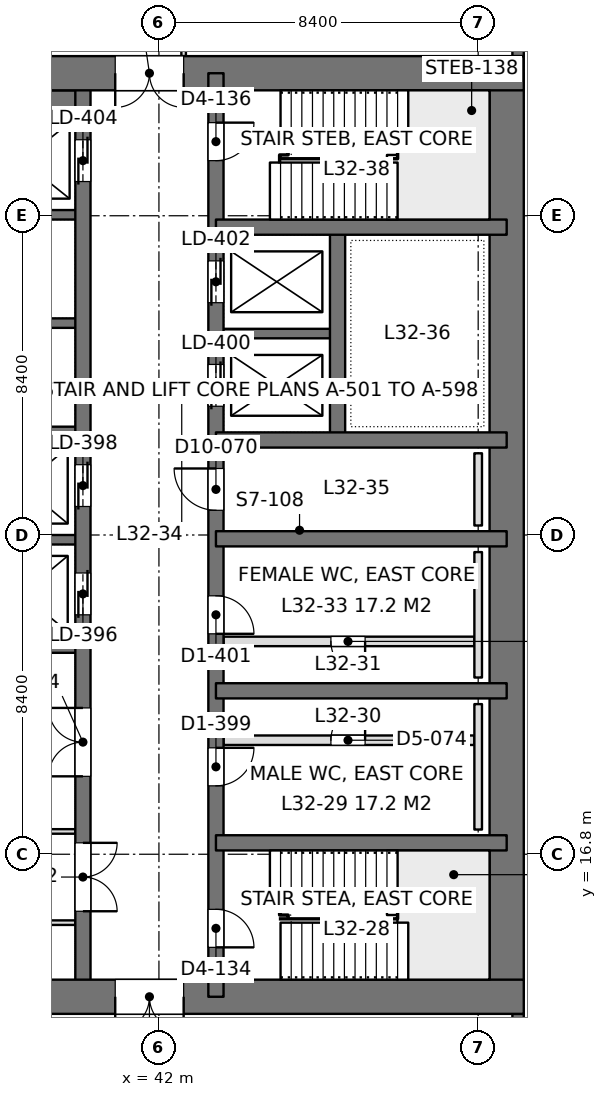
"""IFC4 building model, lengths in metres.
Left out: names, types, materials, properties, quantities, classifications, styles, units other than length and angle.
Written with IfcOpenShell. Run it as: python <this file> out.ifc"""

import sys

from ifc_helpers import new_model, si_unit, direction, frame, frame_2d, origin, place, context, subcontext, project, spatial, rectangle, extrude, element, fill, save


model = new_model("IFC4")
c1 = context("Model", 3, precision=1e-05, world=origin(), true_north=direction((0.0, 1.0)))
c2 = subcontext(c1, "Body", "Model", "MODEL_VIEW")
j1 = project(units=[si_unit("LENGTHUNIT", "METRE"), si_unit("PLANEANGLEUNIT", "RADIAN")], contexts=[c1])
p1 = place(None, origin())
s1 = spatial("IfcSite", under=j1, at=p1, CompositionType="ELEMENT")
p2 = place(p1, origin())
s2 = spatial("IfcBuilding", under=s1, at=p2, CompositionType="ELEMENT")
p3 = place(p2, frame((0.0, 0.0, 142.8)))
s3 = spatial("IfcBuildingStorey", under=s2, at=p3, CompositionType="ELEMENT", Elevation=142.8)
p4 = place(p3, frame((33.6, 13.05, 0.0), z_axis=(0.0, 0.0, 1.0), x_axis=(1.0, 0.0, 0.0)))
e1 = element("IfcWall", 1, at=p4, inside=s3, PredefinedType="SHEAR", context=c2, shape_type="SweptSolid", body=[
    extrude(rectangle(XDim=18.0, YDim=0.9, at=frame_2d((9.0, 0.0))), origin(), (0.0, 0.0, 1.0), 4.2),
])
p5 = place(p4, frame((7.25, 0.0, 0.0)))
e2 = element("IfcOpeningElement", 2, at=p5, cuts=e1, PredefinedType="OPENING", context=c2, shape_type="SweptSolid", body=[
    extrude(rectangle(XDim=1.8, YDim=2.4, at=frame_2d((0.9, 1.2))), frame((0.0, 0.46, 0.0), z_axis=(0.0, -1.0, 0.0), x_axis=(1.0, 0.0, 0.0)), (0.0, 0.0, 1.0), 0.92),
])
p6 = place(p3, frame((33.6, 37.35, 0.0), z_axis=(0.0, 0.0, 1.0), x_axis=(1.0, 0.0, 0.0)))
e3 = element("IfcWall", 3, at=p6, inside=s3, PredefinedType="SHEAR", context=c2, shape_type="SweptSolid", body=[
    extrude(rectangle(XDim=18.0, YDim=0.9, at=frame_2d((9.0, 0.0))), origin(), (0.0, 0.0, 1.0), 4.2),
])
p7 = place(p6, frame((7.25, 0.0, 0.0)))
e4 = element("IfcOpeningElement", 4, at=p7, cuts=e3, PredefinedType="OPENING", context=c2, shape_type="SweptSolid", body=[
    extrude(rectangle(XDim=1.8, YDim=2.4, at=frame_2d((0.9, 1.2))), frame((0.0, 0.46, 0.0), z_axis=(0.0, -1.0, 0.0), x_axis=(1.0, 0.0, 0.0)), (0.0, 0.0, 1.0), 0.92),
])
p8 = place(p3, frame((51.15, 13.05, 0.0), z_axis=(0.0, 0.0, 1.0), x_axis=(0.0, 1.0, 0.0)))
e5 = element("IfcWall", 5, at=p8, inside=s3, PredefinedType="SHEAR", context=c2, shape_type="SweptSolid", body=[
    extrude(rectangle(XDim=24.3, YDim=0.9, at=frame_2d((12.15, 0.0))), origin(), (0.0, 0.0, 1.0), 4.2),
])
p9 = place(p3, frame((43.5, 13.05, 0.0), z_axis=(0.0, 0.0, 1.0), x_axis=(0.0, 1.0, 0.0)))
e6 = element("IfcWall", 6, at=p9, inside=s3, PredefinedType="SHEAR", context=c2, shape_type="SweptSolid", body=[
    extrude(rectangle(XDim=24.3, YDim=0.4, at=frame_2d((12.15, 0.0))), origin(), (0.0, 0.0, 1.0), 4.2),
])
p10 = place(p9, frame((1.3, 0.0, 0.0)))
e7 = element("IfcOpeningElement", 7, at=p10, cuts=e6, PredefinedType="OPENING", context=c2, shape_type="SweptSolid", body=[
    extrude(rectangle(XDim=1.0, YDim=2.2, at=frame_2d((0.5, 1.1))), frame((0.0, 0.21, 0.0), z_axis=(0.0, -1.0, 0.0), x_axis=(1.0, 0.0, 0.0)), (0.0, 0.0, 1.0), 0.42),
])
p11 = place(p9, frame((22.0, 0.0, 0.0)))
e8 = element("IfcOpeningElement", 8, at=p11, cuts=e6, PredefinedType="OPENING", context=c2, shape_type="SweptSolid", body=[
    extrude(rectangle(XDim=1.0, YDim=2.2, at=frame_2d((0.5, 1.1))), frame((0.0, 0.21, 0.0), z_axis=(0.0, -1.0, 0.0), x_axis=(1.0, 0.0, 0.0)), (0.0, 0.0, 1.0), 0.42),
])
p12 = place(p9, frame((5.55, 0.0, 0.0)))
e9 = element("IfcOpeningElement", 9, at=p12, cuts=e6, PredefinedType="OPENING", context=c2, shape_type="SweptSolid", body=[
    extrude(rectangle(XDim=1.0, YDim=2.2, at=frame_2d((0.5, 1.1))), frame((0.0, 0.21, 0.0), z_axis=(0.0, -1.0, 0.0), x_axis=(1.0, 0.0, 0.0)), (0.0, 0.0, 1.0), 0.42),
])
p13 = place(p9, frame((9.55, 0.0, 0.0)))
e10 = element("IfcOpeningElement", 10, at=p13, cuts=e6, PredefinedType="OPENING", context=c2, shape_type="SweptSolid", body=[
    extrude(rectangle(XDim=1.0, YDim=2.2, at=frame_2d((0.5, 1.1))), frame((0.0, 0.21, 0.0), z_axis=(0.0, -1.0, 0.0), x_axis=(1.0, 0.0, 0.0)), (0.0, 0.0, 1.0), 0.42),
])
p14 = place(p9, frame((12.8, 0.0, 0.0)))
e11 = element("IfcOpeningElement", 11, at=p14, cuts=e6, PredefinedType="OPENING", context=c2, shape_type="SweptSolid", body=[
    extrude(rectangle(XDim=1.1, YDim=2.2, at=frame_2d((0.55, 1.1))), frame((0.0, 0.21, 0.0), z_axis=(0.0, -1.0, 0.0), x_axis=(1.0, 0.0, 0.0)), (0.0, 0.0, 1.0), 0.42),
])
p15 = place(p9, frame((15.538, 0.0, 0.0)))
e12 = element("IfcOpeningElement", 12, at=p15, cuts=e6, PredefinedType="OPENING", context=c2, shape_type="SweptSolid", body=[
    extrude(rectangle(XDim=1.1, YDim=2.2, at=frame_2d((0.55, 1.1))), frame((0.0, 0.21, 0.0), z_axis=(0.0, -1.0, 0.0), x_axis=(1.0, 0.0, 0.0)), (0.0, 0.0, 1.0), 0.42),
])
p16 = place(p9, frame((18.262, 0.0, 0.0)))
e13 = element("IfcOpeningElement", 13, at=p16, cuts=e6, PredefinedType="OPENING", context=c2, shape_type="SweptSolid", body=[
    extrude(rectangle(XDim=1.1, YDim=2.2, at=frame_2d((0.55, 1.1))), frame((0.0, 0.21, 0.0), z_axis=(0.0, -1.0, 0.0), x_axis=(1.0, 0.0, 0.0)), (0.0, 0.0, 1.0), 0.42),
])
p17 = place(p3, frame((40.0, 13.05, 0.0), z_axis=(0.0, 0.0, 1.0), x_axis=(0.0, 1.0, 0.0)))
e14 = element("IfcWall", 14, at=p17, inside=s3, PredefinedType="SHEAR", context=c2, shape_type="SweptSolid", body=[
    extrude(rectangle(XDim=24.3, YDim=0.4, at=frame_2d((12.15, 0.0))), origin(), (0.0, 0.0, 1.0), 4.2),
])
p18 = place(p17, frame((10.05, 0.0, 0.0)))
e15 = element("IfcOpeningElement", 15, at=p18, cuts=e14, PredefinedType="OPENING", context=c2, shape_type="SweptSolid", body=[
    extrude(rectangle(XDim=1.1, YDim=2.2, at=frame_2d((0.55, 1.1))), frame((0.0, 0.21, 0.0), z_axis=(0.0, -1.0, 0.0), x_axis=(1.0, 0.0, 0.0)), (0.0, 0.0, 1.0), 0.42),
])
p19 = place(p17, frame((12.9, 0.0, 0.0)))
e16 = element("IfcOpeningElement", 16, at=p19, cuts=e14, PredefinedType="OPENING", context=c2, shape_type="SweptSolid", body=[
    extrude(rectangle(XDim=1.1, YDim=2.2, at=frame_2d((0.55, 1.1))), frame((0.0, 0.21, 0.0), z_axis=(0.0, -1.0, 0.0), x_axis=(1.0, 0.0, 0.0)), (0.0, 0.0, 1.0), 0.42),
])
p20 = place(p17, frame((21.45, 0.0, 0.0)))
e17 = element("IfcOpeningElement", 17, at=p20, cuts=e14, PredefinedType="OPENING", context=c2, shape_type="SweptSolid", body=[
    extrude(rectangle(XDim=1.1, YDim=2.2, at=frame_2d((0.55, 1.1))), frame((0.0, 0.21, 0.0), z_axis=(0.0, -1.0, 0.0), x_axis=(1.0, 0.0, 0.0)), (0.0, 0.0, 1.0), 0.42),
])
p21 = place(p17, frame((2.25, 0.0, 0.0)))
e18 = element("IfcOpeningElement", 18, at=p21, cuts=e14, PredefinedType="OPENING", context=c2, shape_type="SweptSolid", body=[
    extrude(rectangle(XDim=1.8, YDim=2.4, at=frame_2d((0.9, 1.2))), frame((0.0, 0.21, 0.0), z_axis=(0.0, -1.0, 0.0), x_axis=(1.0, 0.0, 0.0)), (0.0, 0.0, 1.0), 0.42),
])
p22 = place(p17, frame((5.8, 0.0, 0.0)))
e19 = element("IfcOpeningElement", 19, at=p22, cuts=e14, PredefinedType="OPENING", context=c2, shape_type="SweptSolid", body=[
    extrude(rectangle(XDim=1.8, YDim=2.4, at=frame_2d((0.9, 1.2))), frame((0.0, 0.21, 0.0), z_axis=(0.0, -1.0, 0.0), x_axis=(1.0, 0.0, 0.0)), (0.0, 0.0, 1.0), 0.42),
])
for number, where, z_axis, x_axis in (
    (20, (51.15, 17.1, 0.0), (0.0, 0.0, 1.0), (-1.0, 0.0, 0.0)),
    (21, (51.15, 21.1, 0.0), (0.0, 0.0, 1.0), (-1.0, 0.0, 0.0)),
    (22, (51.15, 25.1, 0.0), (0.0, 0.0, 1.0), (-1.0, 0.0, 0.0)),
    (23, (51.15, 27.7, 0.0), (0.0, 0.0, 1.0), (-1.0, 0.0, 0.0)),
    (24, (51.15, 33.3, 0.0), (0.0, 0.0, 1.0), (-1.0, 0.0, 0.0)),
):
    element("IfcWall", number, at=place(p3, frame(where, z_axis=z_axis, x_axis=x_axis)), inside=s3, PredefinedType="SHEAR", context=c2, shape_type="SweptSolid", body=[
        extrude(rectangle(XDim=7.65, YDim=0.4, at=frame_2d((3.825, 0.0))), origin(), (0.0, 0.0, 1.0), 4.2),
    ])
p23 = place(p3, frame((46.7, 27.7, 0.0), z_axis=(0.0, 0.0, 1.0), x_axis=(0.0, 1.0, 0.0)))
e25 = element("IfcWall", 25, at=p23, inside=s3, PredefinedType="SHEAR", context=c2, shape_type="SweptSolid", body=[
    extrude(rectangle(XDim=5.6, YDim=0.4, at=frame_2d((2.8, 0.0))), origin(), (0.0, 0.0, 1.0), 4.2),
])
p24 = place(p3, frame((46.7, 30.5, 0.0), z_axis=(0.0, 0.0, 1.0), x_axis=(-1.0, 0.0, 0.0)))
e26 = element("IfcWall", 26, at=p24, inside=s3, PredefinedType="SHEAR", context=c2, shape_type="SweptSolid", body=[
    extrude(rectangle(XDim=3.2, YDim=0.25, at=frame_2d((1.6, 0.0))), origin(), (0.0, 0.0, 1.0), 4.2),
])
p25 = place(p3, frame((40.0, 22.225, 0.0), z_axis=(0.0, 0.0, 1.0), x_axis=(-1.0, 0.0, 0.0)))
e27 = element("IfcWall", 27, at=p25, inside=s3, PredefinedType="SHEAR", context=c2, shape_type="SweptSolid", body=[
    extrude(rectangle(XDim=5.95, YDim=0.25, at=frame_2d((2.975, 0.0))), origin(), (0.0, 0.0, 1.0), 4.2),
])
for number, where, z_axis, x_axis in (
    (28, (40.0, 25.075, 0.0), (0.0, 0.0, 1.0), (-1.0, 0.0, 0.0)),
    (29, (40.0, 27.925, 0.0), (0.0, 0.0, 1.0), (-1.0, 0.0, 0.0)),
    (30, (40.0, 30.775, 0.0), (0.0, 0.0, 1.0), (-1.0, 0.0, 0.0)),
    (31, (40.0, 33.625, 0.0), (0.0, 0.0, 1.0), (-1.0, 0.0, 0.0)),
):
    element("IfcWall", number, at=place(p3, frame(where, z_axis=z_axis, x_axis=x_axis)), inside=s3, PredefinedType="SHEAR", context=c2, shape_type="SweptSolid", body=[
        extrude(rectangle(XDim=3.2, YDim=0.25, at=frame_2d((1.6, 0.0))), origin(), (0.0, 0.0, 1.0), 4.2),
    ])
p26 = place(p3, frame((40.0, 36.625, 0.0), z_axis=(0.0, 0.0, 1.0), x_axis=(-1.0, 0.0, 0.0)))
e32 = element("IfcWall", 32, at=p26, inside=s3, PredefinedType="SHEAR", context=c2, shape_type="SweptSolid", body=[
    extrude(rectangle(XDim=3.2, YDim=0.55, at=frame_2d((1.6, 0.0))), origin(), (0.0, 0.0, 1.0), 4.2),
])
p27 = place(p3, frame((51.45, 42.0, 0.0), z_axis=(0.0, 0.0, 1.0), x_axis=(0.0, -1.0, 0.0)))
e33 = element("IfcWall", 33, at=p27, inside=s3, PredefinedType="SOLIDWALL", context=c2, shape_type="SweptSolid", body=[
    extrude(rectangle(XDim=4.2, YDim=0.3, at=frame_2d((2.1, 0.0))), origin(), (0.0, 0.0, 1.0), 4.05),
])
p28 = place(p27, frame((0.9, 0.0, 0.9)))
e34 = element("IfcOpeningElement", 34, at=p28, cuts=e33, PredefinedType="OPENING", context=c2, shape_type="SweptSolid", body=[
    extrude(rectangle(XDim=2.4, YDim=1.9, at=frame_2d((1.2, 0.95))), frame((0.0, 0.16, 0.0), z_axis=(0.0, -1.0, 0.0), x_axis=(1.0, 0.0, 0.0)), (0.0, 0.0, 1.0), 0.32),
])
p29 = place(p3, frame((51.45, 12.6, 0.0), z_axis=(0.0, 0.0, 1.0), x_axis=(0.0, -1.0, 0.0)))
e35 = element("IfcWall", 35, at=p29, inside=s3, PredefinedType="SOLIDWALL", context=c2, shape_type="SweptSolid", body=[
    extrude(rectangle(XDim=4.2, YDim=0.3, at=frame_2d((2.1, 0.0))), origin(), (0.0, 0.0, 1.0), 4.05),
])
p30 = place(p29, frame((0.9, 0.0, 0.9)))
e36 = element("IfcOpeningElement", 36, at=p30, cuts=e35, PredefinedType="OPENING", context=c2, shape_type="SweptSolid", body=[
    extrude(rectangle(XDim=2.4, YDim=1.9, at=frame_2d((1.2, 0.95))), frame((0.0, 0.16, 0.0), z_axis=(0.0, -1.0, 0.0), x_axis=(1.0, 0.0, 0.0)), (0.0, 0.0, 1.0), 0.32),
])
p31 = place(p3, frame((33.898, 17.4, 0.0), z_axis=(0.0, 0.0, 1.0), x_axis=(1.0, 0.0, 0.0)))
e37 = element("IfcWall", 37, at=p31, inside=s3, PredefinedType="PARTITIONING", context=c2, shape_type="SweptSolid", body=[
    extrude(rectangle(XDim=5.904, YDim=0.12, at=frame_2d((2.952, 0.0))), origin(), (0.0, 0.0, 1.0), 3.55),
])
p32 = place(p31, frame((0.38, 0.0, 0.0)))
e38 = element("IfcOpeningElement", 38, at=p32, cuts=e37, PredefinedType="OPENING", context=c2, shape_type="SweptSolid", body=[
    extrude(rectangle(XDim=1.0, YDim=2.4, at=frame_2d((0.5, 1.2))), frame((0.0, 0.07, 0.0), z_axis=(0.0, -1.0, 0.0), x_axis=(1.0, 0.0, 0.0)), (0.0, 0.0, 1.0), 0.14),
])
p33 = place(p3, frame((33.598, 15.0, 0.0), z_axis=(0.0, 0.0, 1.0), x_axis=(1.0, 0.0, 0.0)))
e39 = element("IfcWall", 39, at=p33, inside=s3, PredefinedType="PARTITIONING", context=c2, shape_type="SweptSolid", body=[
    extrude(rectangle(XDim=6.204, YDim=0.12, at=frame_2d((3.102, 0.0))), origin(), (0.0, 0.0, 1.0), 3.55),
])
p34 = place(p3, frame((42.65, 37.8, 0.0), z_axis=(0.0, 0.0, 1.0), x_axis=(0.0, 1.0, 0.0)))
e40 = element("IfcWall", 40, at=p34, inside=s3, PredefinedType="PARTITIONING", context=c2, shape_type="SweptSolid", body=[
    extrude(rectangle(XDim=2.0, YDim=0.12, at=frame_2d((1.0, 0.0))), origin(), (0.0, 0.0, 1.0), 4.05),
])
p35 = place(p3, frame((43.7, 22.4, 0.0), z_axis=(0.0, 0.0, 1.0), x_axis=(1.0, 0.0, 0.0)))
e41 = element("IfcWall", 41, at=p35, inside=s3, PredefinedType="PARTITIONING", context=c2, shape_type="SweptSolid", body=[
    extrude(rectangle(XDim=6.6, YDim=0.25, at=frame_2d((3.3, 0.0))), origin(), (0.0, 0.0, 1.0), 4.0),
])
p36 = place(p35, frame((2.825, 0.0, 0.0)))
e42 = element("IfcOpeningElement", 42, at=p36, cuts=e41, PredefinedType="OPENING", context=c2, shape_type="SweptSolid", body=[
    extrude(rectangle(XDim=0.9, YDim=2.2, at=frame_2d((0.45, 1.1))), frame((0.0, 0.135, 0.0), z_axis=(0.0, -1.0, 0.0), x_axis=(1.0, 0.0, 0.0)), (0.0, 0.0, 1.0), 0.27),
])
p37 = place(p3, frame((43.7, 19.8, 0.0), z_axis=(0.0, 0.0, 1.0), x_axis=(1.0, 0.0, 0.0)))
e43 = element("IfcWall", 43, at=p37, inside=s3, PredefinedType="PARTITIONING", context=c2, shape_type="SweptSolid", body=[
    extrude(rectangle(XDim=6.6, YDim=0.25, at=frame_2d((3.3, 0.0))), origin(), (0.0, 0.0, 1.0), 4.0),
])
p38 = place(p37, frame((2.825, 0.0, 0.0)))
e44 = element("IfcOpeningElement", 44, at=p38, cuts=e43, PredefinedType="OPENING", context=c2, shape_type="SweptSolid", body=[
    extrude(rectangle(XDim=0.9, YDim=2.2, at=frame_2d((0.45, 1.1))), frame((0.0, 0.135, 0.0), z_axis=(0.0, -1.0, 0.0), x_axis=(1.0, 0.0, 0.0)), (0.0, 0.0, 1.0), 0.27),
])
for number, where, z_axis, x_axis in (
    (45, (50.4, 17.45, 0.0), (0.0, 0.0, 1.0), (0.0, 1.0, 0.0)),
    (46, (50.4, 21.45, 0.0), (0.0, 0.0, 1.0), (0.0, 1.0, 0.0)),
):
    element("IfcWall", number, at=place(p3, frame(where, z_axis=z_axis, x_axis=x_axis)), inside=s3, PredefinedType="PLUMBINGWALL", context=c2, shape_type="SweptSolid", body=[
        extrude(rectangle(XDim=3.3, YDim=0.2, at=frame_2d((1.65, 0.0))), origin(), (0.0, 0.0, 1.0), 1.2),
    ])
p39 = place(p3, frame((50.4, 25.45, 0.0), z_axis=(0.0, 0.0, 1.0), x_axis=(0.0, 1.0, 0.0)))
e47 = element("IfcWall", 47, at=p39, inside=s3, PredefinedType="PLUMBINGWALL", context=c2, shape_type="SweptSolid", body=[
    extrude(rectangle(XDim=1.9, YDim=0.2, at=frame_2d((0.95, 0.0))), origin(), (0.0, 0.0, 1.0), 1.2),
])
p40 = place(p5, frame((1.8, 0.0, 0.0), z_axis=(0.0, 0.0, 1.0), x_axis=(-1.0, 0.0, 0.0)))
e48 = element("IfcDoor", 48, at=p40, inside=s3, OperationType="DOUBLE_DOOR_SINGLE_SWING", PredefinedType="DOOR", context=c2, shape_type="SweptSolid", body=[
    extrude(rectangle(XDim=1.8, YDim=2.4, at=frame_2d((0.9, 1.2))), frame((0.0, 0.025, 0.0), z_axis=(0.0, -1.0, 0.0), x_axis=(1.0, 0.0, 0.0)), (0.0, 0.0, 1.0), 0.05),
])
fill(e2, e48)
p41 = place(p7, frame((1.8, 0.0, 0.0), z_axis=(0.0, 0.0, 1.0), x_axis=(-1.0, 0.0, 0.0)))
e49 = element("IfcDoor", 49, at=p41, inside=s3, OperationType="DOUBLE_DOOR_SINGLE_SWING", PredefinedType="DOOR", context=c2, shape_type="SweptSolid", body=[
    extrude(rectangle(XDim=1.8, YDim=2.4, at=frame_2d((0.9, 1.2))), frame((0.0, 0.025, 0.0), z_axis=(0.0, -1.0, 0.0), x_axis=(1.0, 0.0, 0.0)), (0.0, 0.0, 1.0), 0.05),
])
fill(e4, e49)
p42 = place(p10, frame((1.0, 0.0, 0.0), z_axis=(0.0, 0.0, 1.0), x_axis=(-1.0, 0.0, 0.0)))
e50 = element("IfcDoor", 50, at=p42, inside=s3, OperationType="SINGLE_SWING_RIGHT", PredefinedType="DOOR", context=c2, shape_type="SweptSolid", body=[
    extrude(rectangle(XDim=1.0, YDim=2.2, at=frame_2d((0.5, 1.1))), frame((0.0, 0.025, 0.0), z_axis=(0.0, -1.0, 0.0), x_axis=(1.0, 0.0, 0.0)), (0.0, 0.0, 1.0), 0.05),
])
fill(e7, e50)
p43 = place(p11, frame((1.0, 0.0, 0.0), z_axis=(0.0, 0.0, 1.0), x_axis=(-1.0, 0.0, 0.0)))
e51 = element("IfcDoor", 51, at=p43, inside=s3, OperationType="SINGLE_SWING_LEFT", PredefinedType="DOOR", context=c2, shape_type="SweptSolid", body=[
    extrude(rectangle(XDim=1.0, YDim=2.2, at=frame_2d((0.5, 1.1))), frame((0.0, 0.025, 0.0), z_axis=(0.0, -1.0, 0.0), x_axis=(1.0, 0.0, 0.0)), (0.0, 0.0, 1.0), 0.05),
])
fill(e8, e51)
p44 = place(p12, frame((1.0, 0.0, 0.0), z_axis=(0.0, 0.0, 1.0), x_axis=(-1.0, 0.0, 0.0)))
e52 = element("IfcDoor", 52, at=p44, inside=s3, OperationType="SINGLE_SWING_LEFT", PredefinedType="DOOR", context=c2, shape_type="SweptSolid", body=[
    extrude(rectangle(XDim=1.0, YDim=2.2, at=frame_2d((0.5, 1.1))), frame((0.0, 0.025, 0.0), z_axis=(0.0, -1.0, 0.0), x_axis=(1.0, 0.0, 0.0)), (0.0, 0.0, 1.0), 0.05),
])
fill(e9, e52)
p45 = place(p13, frame((1.0, 0.0, 0.0), z_axis=(0.0, 0.0, 1.0), x_axis=(-1.0, 0.0, 0.0)))
e53 = element("IfcDoor", 53, at=p45, inside=s3, OperationType="SINGLE_SWING_RIGHT", PredefinedType="DOOR", context=c2, shape_type="SweptSolid", body=[
    extrude(rectangle(XDim=1.0, YDim=2.2, at=frame_2d((0.5, 1.1))), frame((0.0, 0.025, 0.0), z_axis=(0.0, -1.0, 0.0), x_axis=(1.0, 0.0, 0.0)), (0.0, 0.0, 1.0), 0.05),
])
fill(e10, e53)
p46 = place(p14, origin())
e54 = element("IfcDoor", 54, at=p46, inside=s3, OperationType="SINGLE_SWING_RIGHT", PredefinedType="DOOR", context=c2, shape_type="SweptSolid", body=[
    extrude(rectangle(XDim=1.1, YDim=2.2, at=frame_2d((0.55, 1.1))), frame((0.0, 0.025, 0.0), z_axis=(0.0, -1.0, 0.0), x_axis=(1.0, 0.0, 0.0)), (0.0, 0.0, 1.0), 0.05),
])
fill(e11, e54)
p47 = place(p18, origin())
e55 = element("IfcDoor", 55, at=p47, inside=s3, OperationType="DOUBLE_DOOR_SLIDING", PredefinedType="DOOR", context=c2, shape_type="SweptSolid", body=[
    extrude(rectangle(XDim=1.1, YDim=2.2, at=frame_2d((0.55, 1.1))), frame((0.0, 0.025, 0.0), z_axis=(0.0, -1.0, 0.0), x_axis=(1.0, 0.0, 0.0)), (0.0, 0.0, 1.0), 0.05),
])
fill(e15, e55)
p48 = place(p19, origin())
e56 = element("IfcDoor", 56, at=p48, inside=s3, OperationType="DOUBLE_DOOR_SLIDING", PredefinedType="DOOR", context=c2, shape_type="SweptSolid", body=[
    extrude(rectangle(XDim=1.1, YDim=2.2, at=frame_2d((0.55, 1.1))), frame((0.0, 0.025, 0.0), z_axis=(0.0, -1.0, 0.0), x_axis=(1.0, 0.0, 0.0)), (0.0, 0.0, 1.0), 0.05),
])
fill(e16, e56)
p49 = place(p20, origin())
e57 = element("IfcDoor", 57, at=p49, inside=s3, OperationType="DOUBLE_DOOR_SLIDING", PredefinedType="DOOR", context=c2, shape_type="SweptSolid", body=[
    extrude(rectangle(XDim=1.1, YDim=2.2, at=frame_2d((0.55, 1.1))), frame((0.0, 0.025, 0.0), z_axis=(0.0, -1.0, 0.0), x_axis=(1.0, 0.0, 0.0)), (0.0, 0.0, 1.0), 0.05),
])
fill(e17, e57)
p50 = place(p15, origin())
e58 = element("IfcDoor", 58, at=p50, inside=s3, OperationType="DOUBLE_DOOR_SLIDING", PredefinedType="DOOR", context=c2, shape_type="SweptSolid", body=[
    extrude(rectangle(XDim=1.1, YDim=2.2, at=frame_2d((0.55, 1.1))), frame((0.0, 0.025, 0.0), z_axis=(0.0, -1.0, 0.0), x_axis=(1.0, 0.0, 0.0)), (0.0, 0.0, 1.0), 0.05),
])
fill(e12, e58)
p51 = place(p16, origin())
e59 = element("IfcDoor", 59, at=p51, inside=s3, OperationType="DOUBLE_DOOR_SLIDING", PredefinedType="DOOR", context=c2, shape_type="SweptSolid", body=[
    extrude(rectangle(XDim=1.1, YDim=2.2, at=frame_2d((0.55, 1.1))), frame((0.0, 0.025, 0.0), z_axis=(0.0, -1.0, 0.0), x_axis=(1.0, 0.0, 0.0)), (0.0, 0.0, 1.0), 0.05),
])
fill(e13, e59)
p52 = place(p21, frame((1.8, 0.0, 0.0), z_axis=(0.0, 0.0, 1.0), x_axis=(-1.0, 0.0, 0.0)))
e60 = element("IfcDoor", 60, at=p52, inside=s3, OperationType="DOUBLE_DOOR_SINGLE_SWING", PredefinedType="DOOR", context=c2, shape_type="SweptSolid", body=[
    extrude(rectangle(XDim=1.8, YDim=2.4, at=frame_2d((0.9, 1.2))), frame((0.0, 0.025, 0.0), z_axis=(0.0, -1.0, 0.0), x_axis=(1.0, 0.0, 0.0)), (0.0, 0.0, 1.0), 0.05),
])
fill(e18, e60)
p53 = place(p22, origin())
e61 = element("IfcDoor", 61, at=p53, inside=s3, OperationType="DOUBLE_DOOR_SINGLE_SWING", PredefinedType="DOOR", context=c2, shape_type="SweptSolid", body=[
    extrude(rectangle(XDim=1.8, YDim=2.4, at=frame_2d((0.9, 1.2))), frame((0.0, 0.025, 0.0), z_axis=(0.0, -1.0, 0.0), x_axis=(1.0, 0.0, 0.0)), (0.0, 0.0, 1.0), 0.05),
])
fill(e19, e61)
p54 = place(p36, frame((0.9, 0.0, 0.0), z_axis=(0.0, 0.0, 1.0), x_axis=(-1.0, 0.0, 0.0)))
e62 = element("IfcDoor", 62, at=p54, inside=s3, OperationType="SINGLE_SWING_LEFT", PredefinedType="DOOR", context=c2, shape_type="SweptSolid", body=[
    extrude(rectangle(XDim=0.9, YDim=2.2, at=frame_2d((0.45, 1.1))), frame((0.0, 0.025, 0.0), z_axis=(0.0, -1.0, 0.0), x_axis=(1.0, 0.0, 0.0)), (0.0, 0.0, 1.0), 0.05),
])
fill(e42, e62)
p55 = place(p38, origin())
e63 = element("IfcDoor", 63, at=p55, inside=s3, OperationType="SINGLE_SWING_RIGHT", PredefinedType="DOOR", context=c2, shape_type="SweptSolid", body=[
    extrude(rectangle(XDim=0.9, YDim=2.2, at=frame_2d((0.45, 1.1))), frame((0.0, 0.025, 0.0), z_axis=(0.0, -1.0, 0.0), x_axis=(1.0, 0.0, 0.0)), (0.0, 0.0, 1.0), 0.05),
])
fill(e44, e63)
save(model, sys.argv[1])
